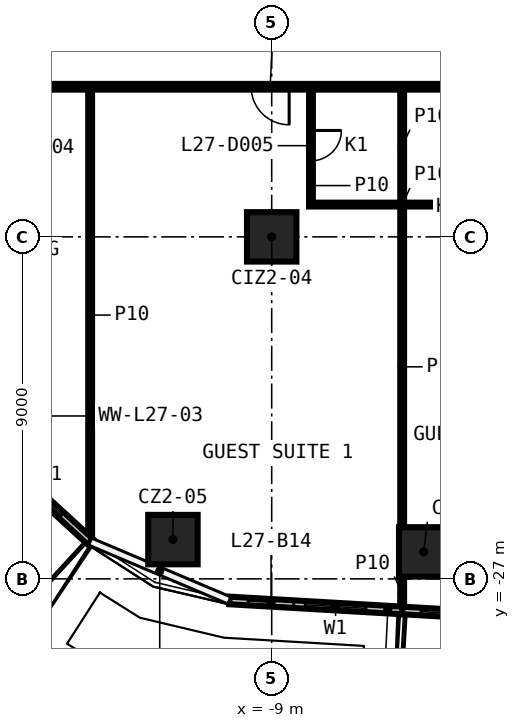
"""IFC4 building model, lengths in metres.
Left out: names, types, materials, properties, quantities, classifications, styles, units other than length and angle.
Written with IfcOpenShell. Run it as: python <this file> out.ifc"""

import sys

from ifc_helpers import new_model, si_unit, direction, frame, frame_2d, origin, origin_2d, place, context, subcontext, project, spatial, rectangle, extrude, element, fill, save


model = new_model("IFC4")
c1 = context("Model", 3, precision=1e-05, world=origin(), true_north=direction((0.0, 1.0)))
c2 = subcontext(c1, "Body", "Model", "MODEL_VIEW")
j1 = project(units=[si_unit("LENGTHUNIT", "METRE"), si_unit("PLANEANGLEUNIT", "RADIAN")], contexts=[c1])
p1 = place(None, origin())
s1 = spatial("IfcSite", under=j1, at=p1, CompositionType="ELEMENT")
p2 = place(p1, origin())
s2 = spatial("IfcBuilding", under=s1, at=p2, CompositionType="ELEMENT")
p3 = place(p2, frame((0.0, 0.0, 124.8)))
s3 = spatial("IfcBuildingStorey", under=s2, at=p3, CompositionType="ELEMENT", Elevation=124.8)
for number, where, z_axis, x_axis in (
    (1, (-5.0, -26.29, 0.0), (0.0, 0.0, 1.0), (1.0, 0.0, 0.0)),
    (2, (-11.599, -25.966, 0.0), (0.0, 0.0, 1.0), (1.0, 0.0, 0.0)),
    (3, (-9.0, -18.0, 0.0), (0.0, 0.0, 1.0), (1.0, 0.0, 0.0)),
):
    element("IfcColumn", number, at=place(p3, frame(where, z_axis=z_axis, x_axis=x_axis)), inside=s3, PredefinedType="COLUMN", context=c2, shape_type="SweptSolid", body=[
        extrude(rectangle(XDim=1.3, YDim=1.3, at=origin_2d()), origin(), (0.0, 0.0, 1.0), 3.3),
    ])
p4 = place(p3, frame((-8.017, -17.15, 0.0), z_axis=(0.0, 0.0, 1.0), x_axis=(1.0, 0.0, 0.0)))
e4 = element("IfcWall", 4, at=p4, inside=s3, PredefinedType="PARTITIONING", context=c2, shape_type="SweptSolid", body=[
    extrude(rectangle(XDim=4.9, YDim=0.1, at=frame_2d((2.45, 0.0))), origin(), (0.0, 0.0, 1.0), 3.3),
])
p5 = place(p3, frame((17.125, -14.05, 0.0), z_axis=(0.0, 0.0, 1.0), x_axis=(-1.0, 0.0, 0.0)))
e5 = element("IfcWall", 5, at=p5, inside=s3, PredefinedType="PARTITIONING", context=c2, shape_type="SweptSolid", body=[
    extrude(rectangle(XDim=34.25, YDim=0.15, at=frame_2d((17.125, 0.0))), origin(), (0.0, 0.0, 1.0), 3.3),
])
p6 = place(p5, frame((32.089, 0.0, 0.0)))
e6 = element("IfcOpeningElement", 6, at=p6, cuts=e5, PredefinedType="OPENING", context=c2, shape_type="SweptSolid", body=[
    extrude(rectangle(XDim=0.9, YDim=2.1, at=frame_2d((0.45, 1.05))), frame((0.0, 0.085, 0.0), z_axis=(0.0, -1.0, 0.0), x_axis=(1.0, 0.0, 0.0)), (0.0, 0.0, 1.0), 0.17),
])
p7 = place(p5, frame((25.666, 0.0, 0.0)))
e7 = element("IfcOpeningElement", 7, at=p7, cuts=e5, PredefinedType="OPENING", context=c2, shape_type="SweptSolid", body=[
    extrude(rectangle(XDim=1.0, YDim=2.1, at=frame_2d((0.5, 1.05))), frame((0.0, 0.085, 0.0), z_axis=(0.0, -1.0, 0.0), x_axis=(1.0, 0.0, 0.0)), (0.0, 0.0, 1.0), 0.17),
])
p8 = place(p5, frame((18.714, 0.0, 0.0)))
e8 = element("IfcOpeningElement", 8, at=p8, cuts=e5, PredefinedType="OPENING", context=c2, shape_type="SweptSolid", body=[
    extrude(rectangle(XDim=1.0, YDim=2.1, at=frame_2d((0.5, 1.05))), frame((0.0, 0.085, 0.0), z_axis=(0.0, -1.0, 0.0), x_axis=(1.0, 0.0, 0.0)), (0.0, 0.0, 1.0), 0.17),
])
p9 = place(p5, frame((16.558, 0.0, 0.0)))
e9 = element("IfcOpeningElement", 9, at=p9, cuts=e5, PredefinedType="OPENING", context=c2, shape_type="SweptSolid", body=[
    extrude(rectangle(XDim=1.0, YDim=2.1, at=frame_2d((0.5, 1.05))), frame((0.0, 0.085, 0.0), z_axis=(0.0, -1.0, 0.0), x_axis=(1.0, 0.0, 0.0)), (0.0, 0.0, 1.0), 0.17),
])
p10 = place(p5, frame((9.602, 0.0, 0.0)))
e10 = element("IfcOpeningElement", 10, at=p10, cuts=e5, PredefinedType="OPENING", context=c2, shape_type="SweptSolid", body=[
    extrude(rectangle(XDim=1.0, YDim=2.1, at=frame_2d((0.5, 1.05))), frame((0.0, 0.085, 0.0), z_axis=(0.0, -1.0, 0.0), x_axis=(1.0, 0.0, 0.0)), (0.0, 0.0, 1.0), 0.17),
])
p11 = place(p5, frame((7.451, 0.0, 0.0)))
e11 = element("IfcOpeningElement", 11, at=p11, cuts=e5, PredefinedType="OPENING", context=c2, shape_type="SweptSolid", body=[
    extrude(rectangle(XDim=1.0, YDim=2.1, at=frame_2d((0.5, 1.05))), frame((0.0, 0.085, 0.0), z_axis=(0.0, -1.0, 0.0), x_axis=(1.0, 0.0, 0.0)), (0.0, 0.0, 1.0), 0.17),
])
p12 = place(p5, frame((0.576, 0.0, 0.0)))
e12 = element("IfcOpeningElement", 12, at=p12, cuts=e5, PredefinedType="OPENING", context=c2, shape_type="SweptSolid", body=[
    extrude(rectangle(XDim=1.0, YDim=2.1, at=frame_2d((0.5, 1.05))), frame((0.0, 0.085, 0.0), z_axis=(0.0, -1.0, 0.0), x_axis=(1.0, 0.0, 0.0)), (0.0, 0.0, 1.0), 0.17),
])
p13 = place(p3, frame((-5.567, -27.811, 0.0), z_axis=(0.0, 0.0, 1.0), x_axis=(0.0, 1.0, 0.0)))
e13 = element("IfcWall", 13, at=p13, inside=s3, PredefinedType="PARTITIONING", context=c2, shape_type="SweptSolid", body=[
    extrude(rectangle(XDim=0.871, YDim=0.1, at=frame_2d((0.435, 0.0))), origin(), (0.0, 0.0, 1.0), 3.3),
])
p14 = place(p3, frame((-5.567, -25.64, 0.0), z_axis=(0.0, 0.0, 1.0), x_axis=(0.0, 1.0, 0.0)))
e14 = element("IfcWall", 14, at=p14, inside=s3, PredefinedType="PARTITIONING", context=c2, shape_type="SweptSolid", body=[
    extrude(rectangle(XDim=8.44, YDim=0.1, at=frame_2d((4.22, 0.0))), origin(), (0.0, 0.0, 1.0), 3.3),
])
p15 = place(p3, frame((-5.567, -17.1, 0.0), z_axis=(0.0, 0.0, 1.0), x_axis=(0.0, 1.0, 0.0)))
e15 = element("IfcWall", 15, at=p15, inside=s3, PredefinedType="PARTITIONING", context=c2, shape_type="SweptSolid", body=[
    extrude(rectangle(XDim=2.975, YDim=0.1, at=frame_2d((1.488, 0.0))), origin(), (0.0, 0.0, 1.0), 3.3),
])
p16 = place(p3, frame((-7.967, -14.125, 0.0), z_axis=(0.0, 0.0, 1.0), x_axis=(0.0, -1.0, 0.0)))
e16 = element("IfcWall", 16, at=p16, inside=s3, PredefinedType="PARTITIONING", context=c2, shape_type="SweptSolid", body=[
    extrude(rectangle(XDim=2.975, YDim=0.1, at=frame_2d((1.488, 0.0))), origin(), (0.0, 0.0, 1.0), 3.3),
])
p17 = place(p16, frame((1.075, 0.0, 0.0)))
e17 = element("IfcOpeningElement", 17, at=p17, cuts=e16, PredefinedType="OPENING", context=c2, shape_type="SweptSolid", body=[
    extrude(rectangle(XDim=0.8, YDim=2.1, at=frame_2d((0.4, 1.05))), frame((0.0, 0.06, 0.0), z_axis=(0.0, -1.0, 0.0), x_axis=(1.0, 0.0, 0.0)), (0.0, 0.0, 1.0), 0.12),
])
p18 = place(p3, frame((-13.777, -25.992, 0.0), z_axis=(0.0, 0.0, 1.0), x_axis=(0.0, 1.0, 0.0)))
e18 = element("IfcWall", 18, at=p18, inside=s3, PredefinedType="PARTITIONING", context=c2, shape_type="SweptSolid", body=[
    extrude(rectangle(XDim=11.867, YDim=0.1, at=frame_2d((5.933, 0.0))), origin(), (0.0, 0.0, 1.0), 3.3),
])
p19 = place(p3, frame((-24.006, -16.636, 0.0), z_axis=(0.0, 0.0, 1.0), x_axis=(0.736923378069, -0.675976282761, 0.0)))
e19 = element("IfcWall", 19, at=p19, inside=s3, PredefinedType="SOLIDWALL", context=c2, shape_type="SweptSolid", body=[
    extrude(rectangle(XDim=13.88, YDim=0.2, at=frame_2d((6.94, 0.0))), origin(), (0.0, 0.0, 1.0), 3.3),
])
p20 = place(p19, frame((2.0, 0.0, 0.6)))
e20 = element("IfcOpeningElement", 20, at=p20, cuts=e19, PredefinedType="OPENING", context=c2, shape_type="SweptSolid", body=[
    extrude(rectangle(XDim=1.6, YDim=2.4, at=frame_2d((0.8, 1.2))), frame((0.0, 0.11, 0.0), z_axis=(0.0, -1.0, 0.0), x_axis=(1.0, 0.0, 0.0)), (0.0, 0.0, 1.0), 0.22),
])
p21 = place(p19, frame((0.3, 0.0, 0.0)))
e21 = element("IfcOpeningElement", 21, at=p21, cuts=e19, PredefinedType="OPENING", context=c2, shape_type="SweptSolid", body=[
    extrude(rectangle(XDim=1.2, YDim=2.4, at=frame_2d((0.6, 1.2))), frame((0.0, 0.11, 0.0), z_axis=(0.0, -1.0, 0.0), x_axis=(1.0, 0.0, 0.0)), (0.0, 0.0, 1.0), 0.22),
])
p22 = place(p19, frame((6.627, 0.0, 0.6)))
e22 = element("IfcOpeningElement", 22, at=p22, cuts=e19, PredefinedType="OPENING", context=c2, shape_type="SweptSolid", body=[
    extrude(rectangle(XDim=1.6, YDim=2.4, at=frame_2d((0.8, 1.2))), frame((0.0, 0.11, 0.0), z_axis=(0.0, -1.0, 0.0), x_axis=(1.0, 0.0, 0.0)), (0.0, 0.0, 1.0), 0.22),
])
p23 = place(p19, frame((5.127, 0.0, 0.0)))
e23 = element("IfcOpeningElement", 23, at=p23, cuts=e19, PredefinedType="OPENING", context=c2, shape_type="SweptSolid", body=[
    extrude(rectangle(XDim=1.2, YDim=2.4, at=frame_2d((0.6, 1.2))), frame((0.0, 0.11, 0.0), z_axis=(0.0, -1.0, 0.0), x_axis=(1.0, 0.0, 0.0)), (0.0, 0.0, 1.0), 0.22),
])
p24 = place(p19, frame((11.253, 0.0, 0.6)))
e24 = element("IfcOpeningElement", 24, at=p24, cuts=e19, PredefinedType="OPENING", context=c2, shape_type="SweptSolid", body=[
    extrude(rectangle(XDim=1.6, YDim=2.4, at=frame_2d((0.8, 1.2))), frame((0.0, 0.11, 0.0), z_axis=(0.0, -1.0, 0.0), x_axis=(1.0, 0.0, 0.0)), (0.0, 0.0, 1.0), 0.22),
])
p25 = place(p19, frame((9.753, 0.0, 0.0)))
e25 = element("IfcOpeningElement", 25, at=p25, cuts=e19, PredefinedType="OPENING", context=c2, shape_type="SweptSolid", body=[
    extrude(rectangle(XDim=1.2, YDim=2.4, at=frame_2d((0.6, 1.2))), frame((0.0, 0.11, 0.0), z_axis=(0.0, -1.0, 0.0), x_axis=(1.0, 0.0, 0.0)), (0.0, 0.0, 1.0), 0.22),
])
p26 = place(p3, frame((-5.567, -27.831, 0.0), z_axis=(0.0, 0.0, 1.0), x_axis=(0.998331175274, -0.057748285484, 0.0)))
e26 = element("IfcWall", 26, at=p26, inside=s3, PredefinedType="SOLIDWALL", context=c2, shape_type="SweptSolid", body=[
    extrude(rectangle(XDim=9.127, YDim=0.2, at=frame_2d((4.564, 0.0))), origin(), (0.0, 0.0, 1.0), 3.3),
])
p27 = place(p26, frame((0.5, 0.0, 0.6)))
e27 = element("IfcOpeningElement", 27, at=p27, cuts=e26, PredefinedType="OPENING", context=c2, shape_type="SweptSolid", body=[
    extrude(rectangle(XDim=1.6, YDim=2.4, at=frame_2d((0.8, 1.2))), frame((0.0, 0.11, 0.0), z_axis=(0.0, -1.0, 0.0), x_axis=(1.0, 0.0, 0.0)), (0.0, 0.0, 1.0), 0.22),
])
p28 = place(p26, frame((2.4, 0.0, 0.0)))
e28 = element("IfcOpeningElement", 28, at=p28, cuts=e26, PredefinedType="OPENING", context=c2, shape_type="SweptSolid", body=[
    extrude(rectangle(XDim=1.2, YDim=2.4, at=frame_2d((0.6, 1.2))), frame((0.0, 0.11, 0.0), z_axis=(0.0, -1.0, 0.0), x_axis=(1.0, 0.0, 0.0)), (0.0, 0.0, 1.0), 0.22),
])
p29 = place(p26, frame((6.564, 0.0, 0.6)))
e29 = element("IfcOpeningElement", 29, at=p29, cuts=e26, PredefinedType="OPENING", context=c2, shape_type="SweptSolid", body=[
    extrude(rectangle(XDim=1.6, YDim=2.4, at=frame_2d((0.8, 1.2))), frame((0.0, 0.11, 0.0), z_axis=(0.0, -1.0, 0.0), x_axis=(1.0, 0.0, 0.0)), (0.0, 0.0, 1.0), 0.22),
])
p30 = place(p26, frame((5.064, 0.0, 0.0)))
e30 = element("IfcOpeningElement", 30, at=p30, cuts=e26, PredefinedType="OPENING", context=c2, shape_type="SweptSolid", body=[
    extrude(rectangle(XDim=1.2, YDim=2.4, at=frame_2d((0.6, 1.2))), frame((0.0, 0.11, 0.0), z_axis=(0.0, -1.0, 0.0), x_axis=(1.0, 0.0, 0.0)), (0.0, 0.0, 1.0), 0.22),
])
p31 = place(p3, frame((-10.115, -27.568, 0.0), z_axis=(0.0, 0.0, 1.0), x_axis=(0.998332643992, -0.057722889224, 0.0)))
e31 = element("IfcWall", 31, at=p31, inside=s3, PredefinedType="SOLIDWALL", context=c2, shape_type="SweptSolid", body=[
    extrude(rectangle(XDim=4.555, YDim=0.2, at=frame_2d((2.278, 0.0))), origin(), (0.0, 0.0, 1.0), 3.3),
])
p32 = place(p31, frame((2.0, 0.0, 0.6)))
e32 = element("IfcOpeningElement", 32, at=p32, cuts=e31, PredefinedType="OPENING", context=c2, shape_type="SweptSolid", body=[
    extrude(rectangle(XDim=1.6, YDim=2.4, at=frame_2d((0.8, 1.2))), frame((0.0, 0.11, 0.0), z_axis=(0.0, -1.0, 0.0), x_axis=(1.0, 0.0, 0.0)), (0.0, 0.0, 1.0), 0.22),
])
p33 = place(p31, frame((0.5, 0.0, 0.0)))
e33 = element("IfcOpeningElement", 33, at=p33, cuts=e31, PredefinedType="OPENING", context=c2, shape_type="SweptSolid", body=[
    extrude(rectangle(XDim=1.2, YDim=2.4, at=frame_2d((0.6, 1.2))), frame((0.0, 0.11, 0.0), z_axis=(0.0, -1.0, 0.0), x_axis=(1.0, 0.0, 0.0)), (0.0, 0.0, 1.0), 0.22),
])
p34 = place(p17, origin())
e34 = element("IfcDoor", 34, at=p34, inside=s3, OperationType="SINGLE_SWING_RIGHT", PredefinedType="DOOR", context=c2, shape_type="SweptSolid", body=[
    extrude(rectangle(XDim=0.8, YDim=2.1, at=frame_2d((0.4, 1.05))), frame((0.0, 0.025, 0.0), z_axis=(0.0, -1.0, 0.0), x_axis=(1.0, 0.0, 0.0)), (0.0, 0.0, 1.0), 0.05),
])
fill(e17, e34)
p35 = place(p7, origin())
e35 = element("IfcDoor", 35, at=p35, inside=s3, OperationType="SINGLE_SWING_LEFT", PredefinedType="DOOR", context=c2, shape_type="SweptSolid", body=[
    extrude(rectangle(XDim=1.0, YDim=2.1, at=frame_2d((0.5, 1.05))), frame((0.0, 0.025, 0.0), z_axis=(0.0, -1.0, 0.0), x_axis=(1.0, 0.0, 0.0)), (0.0, 0.0, 1.0), 0.05),
])
fill(e7, e35)
p36 = place(p24, origin())
e36 = element("IfcWindow", 36, at=p36, inside=s3, PartitioningType="SINGLE_PANEL", PredefinedType="WINDOW", context=c2, shape_type="SweptSolid", body=[
    extrude(rectangle(XDim=1.6, YDim=2.4, at=frame_2d((0.8, 1.2))), frame((0.0, 0.03, 0.0), z_axis=(0.0, -1.0, 0.0), x_axis=(1.0, 0.0, 0.0)), (0.0, 0.0, 1.0), 0.06),
])
fill(e24, e36)
p37 = place(p27, origin())
e37 = element("IfcWindow", 37, at=p37, inside=s3, PartitioningType="SINGLE_PANEL", PredefinedType="WINDOW", context=c2, shape_type="SweptSolid", body=[
    extrude(rectangle(XDim=1.6, YDim=2.4, at=frame_2d((0.8, 1.2))), frame((0.0, 0.03, 0.0), z_axis=(0.0, -1.0, 0.0), x_axis=(1.0, 0.0, 0.0)), (0.0, 0.0, 1.0), 0.06),
])
fill(e27, e37)
p38 = place(p32, origin())
e38 = element("IfcWindow", 38, at=p38, inside=s3, PartitioningType="SINGLE_PANEL", PredefinedType="WINDOW", context=c2, shape_type="SweptSolid", body=[
    extrude(rectangle(XDim=1.6, YDim=2.4, at=frame_2d((0.8, 1.2))), frame((0.0, 0.03, 0.0), z_axis=(0.0, -1.0, 0.0), x_axis=(1.0, 0.0, 0.0)), (0.0, 0.0, 1.0), 0.06),
])
fill(e32, e38)
p39 = place(p33, origin())
e39 = element("IfcDoor", 39, at=p39, inside=s3, OperationType="SLIDING_TO_LEFT", PredefinedType="DOOR", context=c2, shape_type="SweptSolid", body=[
    extrude(rectangle(XDim=1.2, YDim=2.4, at=frame_2d((0.6, 1.2))), frame((0.0, 0.025, 0.0), z_axis=(0.0, -1.0, 0.0), x_axis=(1.0, 0.0, 0.0)), (0.0, 0.0, 1.0), 0.05),
])
fill(e33, e39)
save(model, sys.argv[1])
